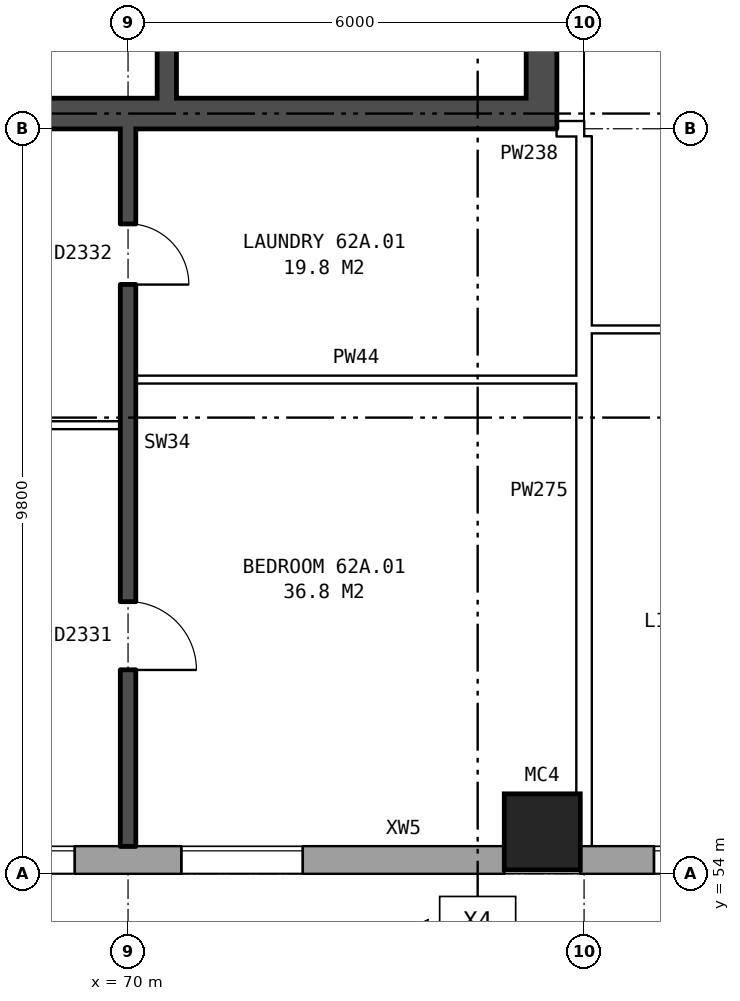
"""IFC4 building model, lengths in metres.
Left out: names, types, materials, properties, quantities, classifications, styles, units other than length and angle.
Written with IfcOpenShell. Run it as: python <this file> out.ifc"""

import sys

from ifc_helpers import new_model, si_unit, direction, frame, frame_2d, origin, origin_2d, place, context, subcontext, project, spatial, rectangle, hollow_rectangle, extrude, element, fill, save


model = new_model("IFC4")
c1 = context("Model", 3, precision=1e-05, world=origin(), true_north=direction((0.0, 1.0)))
c2 = subcontext(c1, "Body", "Model", "MODEL_VIEW")
j1 = project(units=[si_unit("LENGTHUNIT", "METRE"), si_unit("PLANEANGLEUNIT", "RADIAN")], contexts=[c1])
p1 = place(None, origin())
s1 = spatial("IfcSite", under=j1, at=p1, CompositionType="ELEMENT")
p2 = place(p1, origin())
s2 = spatial("IfcBuilding", under=s1, at=p2, CompositionType="ELEMENT")
p3 = place(p2, frame((0.0, 0.0, 221.4)))
s3 = spatial("IfcBuildingStorey", under=s2, at=p3, CompositionType="ELEMENT", Elevation=221.4)
p4 = place(p3, frame((75.45, 54.55, 0.0), z_axis=(0.0, 0.0, 1.0), x_axis=(1.0, 0.0, 0.0)))
e1 = element("IfcColumn", 1, at=p4, inside=s3, PredefinedType="COLUMN", context=c2, shape_type="SweptSolid", body=[
    extrude(hollow_rectangle(XDim=1.0, YDim=1.0, WallThickness=0.055, at=origin_2d()), origin(), (0.0, 0.0, 1.0), 3.1),
])
p5 = place(p3, frame((35.075, 54.18, 0.0), z_axis=(0.0, 0.0, 1.0), x_axis=(1.0, 0.0, 0.0)))
e2 = element("IfcWall", 2, at=p5, inside=s3, PredefinedType="STANDARD", context=c2, shape_type="SweptSolid", body=[
    extrude(rectangle(XDim=39.875, YDim=0.36, at=frame_2d((19.938, 0.0))), origin(), (0.0, 0.0, 1.0), 2.85),
])
p6 = place(p5, frame((2.625, 0.0, 0.8)))
e3 = element("IfcOpeningElement", 3, at=p6, cuts=e2, PredefinedType="OPENING", context=c2, shape_type="SweptSolid", body=[
    extrude(rectangle(XDim=1.6, YDim=1.8, at=frame_2d((0.8, 0.9))), frame((0.0, 0.19, 0.0), z_axis=(0.0, -1.0, 0.0), x_axis=(1.0, 0.0, 0.0)), (0.0, 0.0, 1.0), 0.38),
])
p7 = place(p5, frame((5.625, 0.0, 0.8)))
e4 = element("IfcOpeningElement", 4, at=p7, cuts=e2, PredefinedType="OPENING", context=c2, shape_type="SweptSolid", body=[
    extrude(rectangle(XDim=1.6, YDim=1.8, at=frame_2d((0.8, 0.9))), frame((0.0, 0.19, 0.0), z_axis=(0.0, -1.0, 0.0), x_axis=(1.0, 0.0, 0.0)), (0.0, 0.0, 1.0), 0.38),
])
p8 = place(p5, frame((7.525, 0.0, 0.8)))
e5 = element("IfcOpeningElement", 5, at=p8, cuts=e2, PredefinedType="OPENING", context=c2, shape_type="SweptSolid", body=[
    extrude(rectangle(XDim=1.4, YDim=1.8, at=frame_2d((0.7, 0.9))), frame((0.0, 0.19, 0.0), z_axis=(0.0, -1.0, 0.0), x_axis=(1.0, 0.0, 0.0)), (0.0, 0.0, 1.0), 0.38),
])
p9 = place(p5, frame((11.625, 0.0, 0.8)))
e6 = element("IfcOpeningElement", 6, at=p9, cuts=e2, PredefinedType="OPENING", context=c2, shape_type="SweptSolid", body=[
    extrude(rectangle(XDim=1.6, YDim=1.8, at=frame_2d((0.8, 0.9))), frame((0.0, 0.19, 0.0), z_axis=(0.0, -1.0, 0.0), x_axis=(1.0, 0.0, 0.0)), (0.0, 0.0, 1.0), 0.38),
])
p10 = place(p5, frame((14.625, 0.0, 0.8)))
e7 = element("IfcOpeningElement", 7, at=p10, cuts=e2, PredefinedType="OPENING", context=c2, shape_type="SweptSolid", body=[
    extrude(rectangle(XDim=1.6, YDim=1.8, at=frame_2d((0.8, 0.9))), frame((0.0, 0.19, 0.0), z_axis=(0.0, -1.0, 0.0), x_axis=(1.0, 0.0, 0.0)), (0.0, 0.0, 1.0), 0.38),
])
p11 = place(p5, frame((17.625, 0.0, 0.8)))
e8 = element("IfcOpeningElement", 8, at=p11, cuts=e2, PredefinedType="OPENING", context=c2, shape_type="SweptSolid", body=[
    extrude(rectangle(XDim=1.6, YDim=1.8, at=frame_2d((0.8, 0.9))), frame((0.0, 0.19, 0.0), z_axis=(0.0, -1.0, 0.0), x_axis=(1.0, 0.0, 0.0)), (0.0, 0.0, 1.0), 0.38),
])
p12 = place(p5, frame((20.625, 0.0, 0.8)))
e9 = element("IfcOpeningElement", 9, at=p12, cuts=e2, PredefinedType="OPENING", context=c2, shape_type="SweptSolid", body=[
    extrude(rectangle(XDim=1.6, YDim=1.8, at=frame_2d((0.8, 0.9))), frame((0.0, 0.19, 0.0), z_axis=(0.0, -1.0, 0.0), x_axis=(1.0, 0.0, 0.0)), (0.0, 0.0, 1.0), 0.38),
])
p13 = place(p5, frame((23.625, 0.0, 0.8)))
e10 = element("IfcOpeningElement", 10, at=p13, cuts=e2, PredefinedType="OPENING", context=c2, shape_type="SweptSolid", body=[
    extrude(rectangle(XDim=1.6, YDim=1.8, at=frame_2d((0.8, 0.9))), frame((0.0, 0.19, 0.0), z_axis=(0.0, -1.0, 0.0), x_axis=(1.0, 0.0, 0.0)), (0.0, 0.0, 1.0), 0.38),
])
p14 = place(p5, frame((26.075, 0.0, 0.15)))
e11 = element("IfcOpeningElement", 11, at=p14, cuts=e2, PredefinedType="OPENING", context=c2, shape_type="SweptSolid", body=[
    extrude(rectangle(XDim=0.8, YDim=1.5, at=frame_2d((0.4, 0.75))), frame((0.0, 0.19, 0.0), z_axis=(0.0, -1.0, 0.0), x_axis=(1.0, 0.0, 0.0)), (0.0, 0.0, 1.0), 0.38),
])
p15 = place(p5, frame((29.625, 0.0, 0.8)))
e12 = element("IfcOpeningElement", 12, at=p15, cuts=e2, PredefinedType="OPENING", context=c2, shape_type="SweptSolid", body=[
    extrude(rectangle(XDim=1.6, YDim=1.8, at=frame_2d((0.8, 0.9))), frame((0.0, 0.19, 0.0), z_axis=(0.0, -1.0, 0.0), x_axis=(1.0, 0.0, 0.0)), (0.0, 0.0, 1.0), 0.38),
])
p16 = place(p5, frame((32.625, 0.0, 0.8)))
e13 = element("IfcOpeningElement", 13, at=p16, cuts=e2, PredefinedType="OPENING", context=c2, shape_type="SweptSolid", body=[
    extrude(rectangle(XDim=1.6, YDim=1.8, at=frame_2d((0.8, 0.9))), frame((0.0, 0.19, 0.0), z_axis=(0.0, -1.0, 0.0), x_axis=(1.0, 0.0, 0.0)), (0.0, 0.0, 1.0), 0.38),
])
p17 = place(p5, frame((35.625, 0.0, 0.8)))
e14 = element("IfcOpeningElement", 14, at=p17, cuts=e2, PredefinedType="OPENING", context=c2, shape_type="SweptSolid", body=[
    extrude(rectangle(XDim=1.6, YDim=1.8, at=frame_2d((0.8, 0.9))), frame((0.0, 0.19, 0.0), z_axis=(0.0, -1.0, 0.0), x_axis=(1.0, 0.0, 0.0)), (0.0, 0.0, 1.0), 0.38),
])
p18 = place(p5, frame((9.225, 0.0, 1.7)))
e15 = element("IfcOpeningElement", 15, at=p18, cuts=e2, PredefinedType="OPENING", context=c2, shape_type="SweptSolid", body=[
    extrude(rectangle(XDim=0.6, YDim=0.9, at=frame_2d((0.3, 0.45))), frame((0.0, 0.19, 0.0), z_axis=(0.0, -1.0, 0.0), x_axis=(1.0, 0.0, 0.0)), (0.0, 0.0, 1.0), 0.38),
])
p19 = place(p5, frame((28.075, 0.0, 1.65)))
e16 = element("IfcOpeningElement", 16, at=p19, cuts=e2, PredefinedType="OPENING", context=c2, shape_type="SweptSolid", body=[
    extrude(rectangle(XDim=0.6, YDim=0.9, at=frame_2d((0.3, 0.45))), frame((0.0, 0.19, 0.0), z_axis=(0.0, -1.0, 0.0), x_axis=(1.0, 0.0, 0.0)), (0.0, 0.0, 1.0), 0.38),
])
p20 = place(p3, frame((75.95, 54.18, 0.0), z_axis=(0.0, 0.0, 1.0), x_axis=(1.0, 0.0, 0.0)))
e17 = element("IfcWall", 17, at=p20, inside=s3, PredefinedType="STANDARD", context=c2, shape_type="SweptSolid", body=[
    extrude(rectangle(XDim=55.1, YDim=0.36, at=frame_2d((27.55, 0.0))), origin(), (0.0, 0.0, 1.0), 2.85),
])
p21 = place(p20, frame((0.969, 0.0, 0.8)))
e18 = element("IfcOpeningElement", 18, at=p21, cuts=e17, PredefinedType="OPENING", context=c2, shape_type="SweptSolid", body=[
    extrude(rectangle(XDim=1.6, YDim=1.8, at=frame_2d((0.8, 0.9))), frame((0.0, 0.19, 0.0), z_axis=(0.0, -1.0, 0.0), x_axis=(1.0, 0.0, 0.0)), (0.0, 0.0, 1.0), 0.38),
])
p22 = place(p20, frame((4.406, 0.0, 0.8)))
e19 = element("IfcOpeningElement", 19, at=p22, cuts=e17, PredefinedType="OPENING", context=c2, shape_type="SweptSolid", body=[
    extrude(rectangle(XDim=1.6, YDim=1.8, at=frame_2d((0.8, 0.9))), frame((0.0, 0.19, 0.0), z_axis=(0.0, -1.0, 0.0), x_axis=(1.0, 0.0, 0.0)), (0.0, 0.0, 1.0), 0.38),
])
p23 = place(p20, frame((7.844, 0.0, 0.8)))
e20 = element("IfcOpeningElement", 20, at=p23, cuts=e17, PredefinedType="OPENING", context=c2, shape_type="SweptSolid", body=[
    extrude(rectangle(XDim=1.6, YDim=1.8, at=frame_2d((0.8, 0.9))), frame((0.0, 0.19, 0.0), z_axis=(0.0, -1.0, 0.0), x_axis=(1.0, 0.0, 0.0)), (0.0, 0.0, 1.0), 0.38),
])
p24 = place(p20, frame((11.281, 0.0, 0.8)))
e21 = element("IfcOpeningElement", 21, at=p24, cuts=e17, PredefinedType="OPENING", context=c2, shape_type="SweptSolid", body=[
    extrude(rectangle(XDim=1.6, YDim=1.8, at=frame_2d((0.8, 0.9))), frame((0.0, 0.19, 0.0), z_axis=(0.0, -1.0, 0.0), x_axis=(1.0, 0.0, 0.0)), (0.0, 0.0, 1.0), 0.38),
])
p25 = place(p20, frame((14.719, 0.0, 0.8)))
e22 = element("IfcOpeningElement", 22, at=p25, cuts=e17, PredefinedType="OPENING", context=c2, shape_type="SweptSolid", body=[
    extrude(rectangle(XDim=1.6, YDim=1.8, at=frame_2d((0.8, 0.9))), frame((0.0, 0.19, 0.0), z_axis=(0.0, -1.0, 0.0), x_axis=(1.0, 0.0, 0.0)), (0.0, 0.0, 1.0), 0.38),
])
p26 = place(p20, frame((18.156, 0.0, 0.8)))
e23 = element("IfcOpeningElement", 23, at=p26, cuts=e17, PredefinedType="OPENING", context=c2, shape_type="SweptSolid", body=[
    extrude(rectangle(XDim=1.6, YDim=1.8, at=frame_2d((0.8, 0.9))), frame((0.0, 0.19, 0.0), z_axis=(0.0, -1.0, 0.0), x_axis=(1.0, 0.0, 0.0)), (0.0, 0.0, 1.0), 0.38),
])
p27 = place(p20, frame((21.594, 0.0, 0.8)))
e24 = element("IfcOpeningElement", 24, at=p27, cuts=e17, PredefinedType="OPENING", context=c2, shape_type="SweptSolid", body=[
    extrude(rectangle(XDim=1.6, YDim=1.8, at=frame_2d((0.8, 0.9))), frame((0.0, 0.19, 0.0), z_axis=(0.0, -1.0, 0.0), x_axis=(1.0, 0.0, 0.0)), (0.0, 0.0, 1.0), 0.38),
])
p28 = place(p20, frame((25.031, 0.0, 0.8)))
e25 = element("IfcOpeningElement", 25, at=p28, cuts=e17, PredefinedType="OPENING", context=c2, shape_type="SweptSolid", body=[
    extrude(rectangle(XDim=1.6, YDim=1.8, at=frame_2d((0.8, 0.9))), frame((0.0, 0.19, 0.0), z_axis=(0.0, -1.0, 0.0), x_axis=(1.0, 0.0, 0.0)), (0.0, 0.0, 1.0), 0.38),
])
p29 = place(p20, frame((28.469, 0.0, 0.8)))
e26 = element("IfcOpeningElement", 26, at=p29, cuts=e17, PredefinedType="OPENING", context=c2, shape_type="SweptSolid", body=[
    extrude(rectangle(XDim=1.6, YDim=1.8, at=frame_2d((0.8, 0.9))), frame((0.0, 0.19, 0.0), z_axis=(0.0, -1.0, 0.0), x_axis=(1.0, 0.0, 0.0)), (0.0, 0.0, 1.0), 0.38),
])
p30 = place(p20, frame((31.906, 0.0, 0.8)))
e27 = element("IfcOpeningElement", 27, at=p30, cuts=e17, PredefinedType="OPENING", context=c2, shape_type="SweptSolid", body=[
    extrude(rectangle(XDim=1.6, YDim=1.8, at=frame_2d((0.8, 0.9))), frame((0.0, 0.19, 0.0), z_axis=(0.0, -1.0, 0.0), x_axis=(1.0, 0.0, 0.0)), (0.0, 0.0, 1.0), 0.38),
])
p31 = place(p20, frame((35.344, 0.0, 0.8)))
e28 = element("IfcOpeningElement", 28, at=p31, cuts=e17, PredefinedType="OPENING", context=c2, shape_type="SweptSolid", body=[
    extrude(rectangle(XDim=1.6, YDim=1.8, at=frame_2d((0.8, 0.9))), frame((0.0, 0.19, 0.0), z_axis=(0.0, -1.0, 0.0), x_axis=(1.0, 0.0, 0.0)), (0.0, 0.0, 1.0), 0.38),
])
p32 = place(p20, frame((38.781, 0.0, 0.8)))
e29 = element("IfcOpeningElement", 29, at=p32, cuts=e17, PredefinedType="OPENING", context=c2, shape_type="SweptSolid", body=[
    extrude(rectangle(XDim=1.6, YDim=1.8, at=frame_2d((0.8, 0.9))), frame((0.0, 0.19, 0.0), z_axis=(0.0, -1.0, 0.0), x_axis=(1.0, 0.0, 0.0)), (0.0, 0.0, 1.0), 0.38),
])
p33 = place(p20, frame((42.219, 0.0, 0.8)))
e30 = element("IfcOpeningElement", 30, at=p33, cuts=e17, PredefinedType="OPENING", context=c2, shape_type="SweptSolid", body=[
    extrude(rectangle(XDim=1.6, YDim=1.8, at=frame_2d((0.8, 0.9))), frame((0.0, 0.19, 0.0), z_axis=(0.0, -1.0, 0.0), x_axis=(1.0, 0.0, 0.0)), (0.0, 0.0, 1.0), 0.38),
])
p34 = place(p20, frame((45.656, 0.0, 0.8)))
e31 = element("IfcOpeningElement", 31, at=p34, cuts=e17, PredefinedType="OPENING", context=c2, shape_type="SweptSolid", body=[
    extrude(rectangle(XDim=1.6, YDim=1.8, at=frame_2d((0.8, 0.9))), frame((0.0, 0.19, 0.0), z_axis=(0.0, -1.0, 0.0), x_axis=(1.0, 0.0, 0.0)), (0.0, 0.0, 1.0), 0.38),
])
p35 = place(p20, frame((49.094, 0.0, 0.8)))
e32 = element("IfcOpeningElement", 32, at=p35, cuts=e17, PredefinedType="OPENING", context=c2, shape_type="SweptSolid", body=[
    extrude(rectangle(XDim=1.6, YDim=1.8, at=frame_2d((0.8, 0.9))), frame((0.0, 0.19, 0.0), z_axis=(0.0, -1.0, 0.0), x_axis=(1.0, 0.0, 0.0)), (0.0, 0.0, 1.0), 0.38),
])
p36 = place(p20, frame((52.531, 0.0, 0.8)))
e33 = element("IfcOpeningElement", 33, at=p36, cuts=e17, PredefinedType="OPENING", context=c2, shape_type="SweptSolid", body=[
    extrude(rectangle(XDim=1.6, YDim=1.8, at=frame_2d((0.8, 0.9))), frame((0.0, 0.19, 0.0), z_axis=(0.0, -1.0, 0.0), x_axis=(1.0, 0.0, 0.0)), (0.0, 0.0, 1.0), 0.38),
])
p37 = place(p3, frame((75.44, 63.8, 0.0), z_axis=(0.0, 0.0, 1.0), x_axis=(0.0, 1.0, 0.0)))
e34 = element("IfcWall", 34, at=p37, inside=s3, PredefinedType="SHEAR", context=c2, shape_type="SweptSolid", body=[
    extrude(rectangle(XDim=12.4, YDim=0.4, at=frame_2d((6.2, 0.0))), origin(), (0.0, 0.0, 1.0), 2.85),
])
p38 = place(p37, frame((9.8, 0.0, 0.0)))
e35 = element("IfcOpeningElement", 35, at=p38, cuts=e34, PredefinedType="OPENING", context=c2, shape_type="SweptSolid", body=[
    extrude(rectangle(XDim=1.1, YDim=2.1, at=frame_2d((0.55, 1.05))), frame((0.0, 0.21, 0.0), z_axis=(0.0, -1.0, 0.0), x_axis=(1.0, 0.0, 0.0)), (0.0, 0.0, 1.0), 0.42),
])
p39 = place(p3, frame((67.04, 64.0, 0.0), z_axis=(0.0, 0.0, 1.0), x_axis=(1.0, 0.0, 0.0)))
e36 = element("IfcWall", 36, at=p39, inside=s3, PredefinedType="SHEAR", context=c2, shape_type="SweptSolid", body=[
    extrude(rectangle(XDim=8.2, YDim=0.4, at=frame_2d((4.1, 0.0))), origin(), (0.0, 0.0, 1.0), 2.85),
])
p40 = place(p3, frame((70.51, 64.2, 0.0), z_axis=(0.0, 0.0, 1.0), x_axis=(0.0, 1.0, 0.0)))
e37 = element("IfcWall", 37, at=p40, inside=s3, PredefinedType="SHEAR", context=c2, shape_type="SweptSolid", body=[
    extrude(rectangle(XDim=2.525, YDim=0.25, at=frame_2d((1.263, 0.0))), origin(), (0.0, 0.0, 1.0), 2.85),
])
p41 = place(p3, frame((64.1, 59.9, 0.0), z_axis=(0.0, 0.0, 1.0), x_axis=(1.0, 0.0, 0.0)))
e38 = element("IfcWall", 38, at=p41, inside=s3, PredefinedType="PARTITIONING", context=c2, shape_type="SweptSolid", body=[
    extrude(rectangle(XDim=5.8, YDim=0.1, at=frame_2d((2.9, 0.0))), origin(), (0.0, 0.0, 1.0), 2.85),
])
p42 = place(p41, frame((3.6, 0.0, 0.0)))
e39 = element("IfcOpeningElement", 39, at=p42, cuts=e38, PredefinedType="OPENING", context=c2, shape_type="SweptSolid", body=[
    extrude(rectangle(XDim=0.9, YDim=2.1, at=frame_2d((0.45, 1.05))), frame((0.0, 0.06, 0.0), z_axis=(0.0, -1.0, 0.0), x_axis=(1.0, 0.0, 0.0)), (0.0, 0.0, 1.0), 0.12),
])
p43 = place(p41, frame((0.7, 0.0, 0.0)))
e40 = element("IfcOpeningElement", 40, at=p43, cuts=e38, PredefinedType="OPENING", context=c2, shape_type="SweptSolid", body=[
    extrude(rectangle(XDim=0.9, YDim=2.1, at=frame_2d((0.45, 1.05))), frame((0.0, 0.06, 0.0), z_axis=(0.0, -1.0, 0.0), x_axis=(1.0, 0.0, 0.0)), (0.0, 0.0, 1.0), 0.12),
])
p44 = place(p3, frame((70.1, 60.5, 0.0), z_axis=(0.0, 0.0, 1.0), x_axis=(1.0, 0.0, 0.0)))
e41 = element("IfcWall", 41, at=p44, inside=s3, PredefinedType="PARTITIONING", context=c2, shape_type="SweptSolid", body=[
    extrude(rectangle(XDim=5.8, YDim=0.1, at=frame_2d((2.9, 0.0))), origin(), (0.0, 0.0, 1.0), 2.85),
])
p45 = place(p3, frame((76.1, 61.16, 0.0), z_axis=(0.0, 0.0, 1.0), x_axis=(1.0, 0.0, 0.0)))
e42 = element("IfcWall", 42, at=p45, inside=s3, PredefinedType="PARTITIONING", context=c2, shape_type="SweptSolid", body=[
    extrude(rectangle(XDim=3.338, YDim=0.1, at=frame_2d((1.669, 0.0))), origin(), (0.0, 0.0, 1.0), 2.85),
])
p46 = place(p45, frame((1.219, 0.0, 0.0)))
e43 = element("IfcOpeningElement", 43, at=p46, cuts=e42, PredefinedType="OPENING", context=c2, shape_type="SweptSolid", body=[
    extrude(rectangle(XDim=0.9, YDim=2.1, at=frame_2d((0.45, 1.05))), frame((0.0, 0.06, 0.0), z_axis=(0.0, -1.0, 0.0), x_axis=(1.0, 0.0, 0.0)), (0.0, 0.0, 1.0), 0.12),
])
p47 = place(p3, frame((75.64, 63.8, 0.0), z_axis=(0.0, 0.0, 1.0), x_axis=(1.0, 0.0, 0.0)))
e44 = element("IfcWall", 44, at=p47, inside=s3, PredefinedType="PARTITIONING", context=c2, shape_type="SweptSolid", body=[
    extrude(rectangle(XDim=0.36, YDim=0.2, at=frame_2d((0.18, 0.0))), origin(), (0.0, 0.0, 1.0), 2.85),
])
p48 = place(p3, frame((70.0, 54.36, 0.0), z_axis=(0.0, 0.0, 1.0), x_axis=(0.0, 1.0, 0.0)))
e45 = element("IfcWall", 45, at=p48, inside=s3, PredefinedType="SOLIDWALL", context=c2, shape_type="SweptSolid", body=[
    extrude(rectangle(XDim=9.44, YDim=0.2, at=frame_2d((4.72, 0.0))), origin(), (0.0, 0.0, 1.0), 2.85),
])
p49 = place(p48, frame((2.32, 0.0, 0.0)))
e46 = element("IfcOpeningElement", 46, at=p49, cuts=e45, PredefinedType="OPENING", context=c2, shape_type="SweptSolid", body=[
    extrude(rectangle(XDim=0.9, YDim=2.1, at=frame_2d((0.45, 1.05))), frame((0.0, 0.11, 0.0), z_axis=(0.0, -1.0, 0.0), x_axis=(1.0, 0.0, 0.0)), (0.0, 0.0, 1.0), 0.22),
])
p50 = place(p48, frame((7.39, 0.0, 0.0)))
e47 = element("IfcOpeningElement", 47, at=p50, cuts=e45, PredefinedType="OPENING", context=c2, shape_type="SweptSolid", body=[
    extrude(rectangle(XDim=0.8, YDim=2.1, at=frame_2d((0.4, 1.05))), frame((0.0, 0.11, 0.0), z_axis=(0.0, -1.0, 0.0), x_axis=(1.0, 0.0, 0.0)), (0.0, 0.0, 1.0), 0.22),
])
p51 = place(p3, frame((76.0, 54.36, 0.0), z_axis=(0.0, 0.0, 1.0), x_axis=(0.0, 1.0, 0.0)))
e48 = element("IfcWall", 48, at=p51, inside=s3, PredefinedType="PARTITIONING", context=c2, shape_type="SweptSolid", body=[
    extrude(rectangle(XDim=9.34, YDim=0.2, at=frame_2d((4.67, 0.0))), origin(), (0.0, 0.0, 1.0), 2.85),
])
p52 = place(p16, origin())
e49 = element("IfcWindow", 49, at=p52, inside=s3, PartitioningType="SINGLE_PANEL", PredefinedType="WINDOW", context=c2, shape_type="SweptSolid", body=[
    extrude(rectangle(XDim=1.6, YDim=1.8, at=frame_2d((0.8, 0.9))), frame((0.0, 0.15, 0.0), z_axis=(0.0, -1.0, 0.0), x_axis=(1.0, 0.0, 0.0)), (0.0, 0.0, 1.0), 0.06),
])
fill(e13, e49)
p53 = place(p17, origin())
e50 = element("IfcWindow", 50, at=p53, inside=s3, PartitioningType="SINGLE_PANEL", PredefinedType="WINDOW", context=c2, shape_type="SweptSolid", body=[
    extrude(rectangle(XDim=1.6, YDim=1.8, at=frame_2d((0.8, 0.9))), frame((0.0, 0.15, 0.0), z_axis=(0.0, -1.0, 0.0), x_axis=(1.0, 0.0, 0.0)), (0.0, 0.0, 1.0), 0.06),
])
fill(e14, e50)
p54 = place(p21, origin())
e51 = element("IfcWindow", 51, at=p54, inside=s3, PartitioningType="SINGLE_PANEL", PredefinedType="WINDOW", context=c2, shape_type="SweptSolid", body=[
    extrude(rectangle(XDim=1.6, YDim=1.8, at=frame_2d((0.8, 0.9))), frame((0.0, 0.15, 0.0), z_axis=(0.0, -1.0, 0.0), x_axis=(1.0, 0.0, 0.0)), (0.0, 0.0, 1.0), 0.06),
])
fill(e18, e51)
p55 = place(p49, frame((0.9, 0.0, 0.0), z_axis=(0.0, 0.0, 1.0), x_axis=(-1.0, 0.0, 0.0)))
e52 = element("IfcDoor", 52, at=p55, inside=s3, OperationType="SINGLE_SWING_RIGHT", PredefinedType="DOOR", context=c2, shape_type="SweptSolid", body=[
    extrude(rectangle(XDim=0.9, YDim=2.1, at=frame_2d((0.45, 1.05))), frame((0.0, 0.025, 0.0), z_axis=(0.0, -1.0, 0.0), x_axis=(1.0, 0.0, 0.0)), (0.0, 0.0, 1.0), 0.05),
])
fill(e46, e52)
p56 = place(p50, frame((0.8, 0.0, 0.0), z_axis=(0.0, 0.0, 1.0), x_axis=(-1.0, 0.0, 0.0)))
e53 = element("IfcDoor", 53, at=p56, inside=s3, OperationType="SINGLE_SWING_RIGHT", PredefinedType="DOOR", context=c2, shape_type="SweptSolid", body=[
    extrude(rectangle(XDim=0.8, YDim=2.1, at=frame_2d((0.4, 1.05))), frame((0.0, 0.025, 0.0), z_axis=(0.0, -1.0, 0.0), x_axis=(1.0, 0.0, 0.0)), (0.0, 0.0, 1.0), 0.05),
])
fill(e47, e53)
save(model, sys.argv[1])
